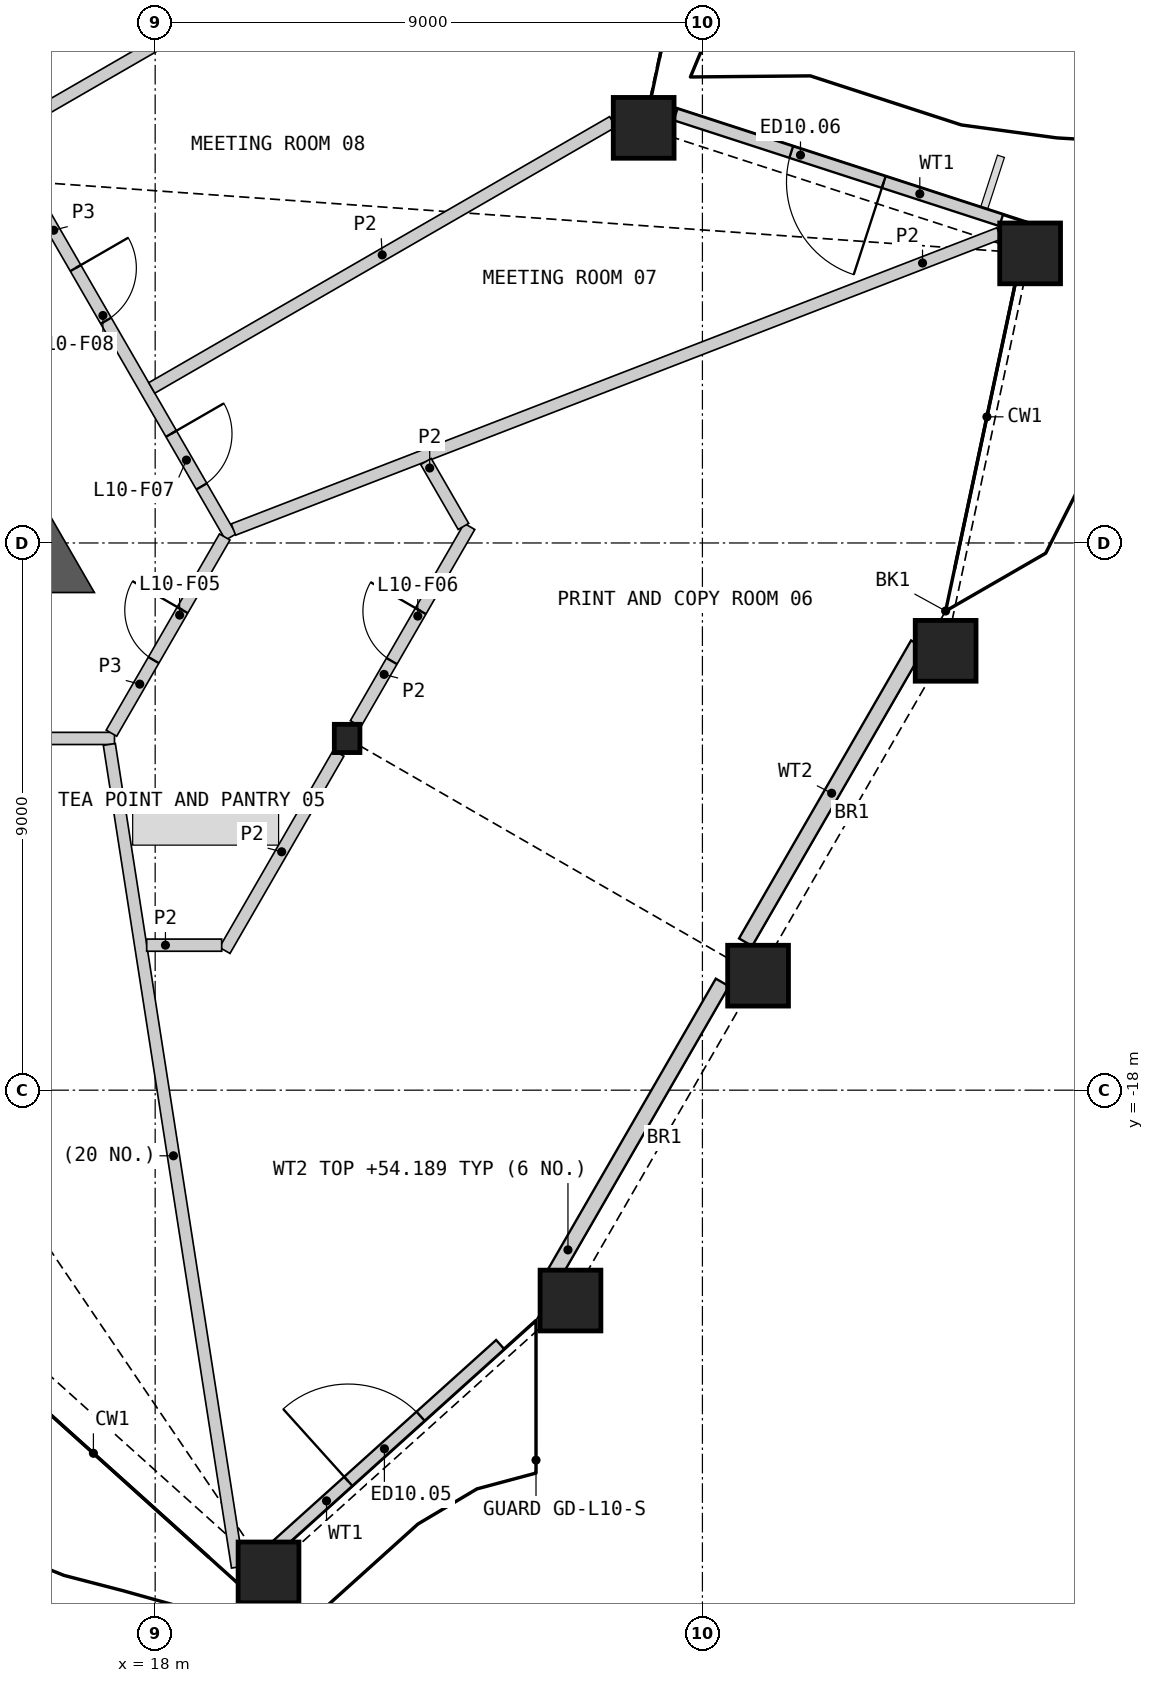
"""IFC4 building model, lengths in metres.
Left out: names, types, materials, properties, quantities, classifications, styles, units other than length and angle.
Written with IfcOpenShell. Run it as: python <this file> out.ifc"""

import sys

from ifc_helpers import new_model, si_unit, direction, frame, frame_2d, origin, origin_2d, place, context, subcontext, project, spatial, polyline, rectangle, hollow_rectangle, i_section, outline, extrude, element, fill, save


model = new_model("IFC4")
c1 = context("Model", 3, precision=1e-05, world=origin(), true_north=direction((0.0, 1.0)))
c2 = subcontext(c1, "Body", "Model", "MODEL_VIEW")
j1 = project(units=[si_unit("LENGTHUNIT", "METRE"), si_unit("PLANEANGLEUNIT", "RADIAN")], contexts=[c1])
p1 = place(None, origin())
s1 = spatial("IfcSite", under=j1, at=p1, CompositionType="ELEMENT")
p2 = place(p1, origin())
s2 = spatial("IfcBuilding", under=s1, at=p2, CompositionType="ELEMENT")
p3 = place(p2, frame((0.0, 0.0, 51.0)))
s3 = spatial("IfcBuildingStorey", under=s2, at=p3, CompositionType="ELEMENT", Elevation=51.0)
for number, where, z_axis, x_axis in (
    (1, (19.864, -25.931, 0.0), (0.0, 0.0, 1.0), (1.0, 0.0, 0.0)),
    (2, (24.83, -21.46, 0.0), (0.0, 0.0, 1.0), (1.0, 0.0, 0.0)),
    (3, (27.915, -16.117, 0.0), (0.0, 0.0, 1.0), (1.0, 0.0, 0.0)),
    (4, (31.0, -10.774, 0.0), (0.0, 0.0, 1.0), (1.0, 0.0, 0.0)),
    (5, (32.389, -4.237, 0.0), (0.0, 0.0, 1.0), (1.0, 0.0, 0.0)),
    (6, (26.034, -2.172, 0.0), (0.0, 0.0, 1.0), (1.0, 0.0, 0.0)),
):
    element("IfcColumn", number, at=place(p3, frame(where, z_axis=z_axis, x_axis=x_axis)), inside=s3, PredefinedType="COLUMN", context=c2, shape_type="SweptSolid", body=[
        extrude(hollow_rectangle(XDim=1.0, YDim=1.0, WallThickness=0.07, at=origin_2d()), origin(), (0.0, 0.0, 1.0), 4.2),
    ])
p4 = place(p3, frame((21.157, -12.215, 0.0), z_axis=(0.0, 0.0, 1.0), x_axis=(1.0, 0.0, 0.0)))
e7 = element("IfcColumn", 7, at=p4, inside=s3, PredefinedType="COLUMN", context=c2, shape_type="SweptSolid", body=[
    extrude(i_section(OverallWidth=0.421, OverallDepth=0.465, WebThickness=0.045, FlangeThickness=0.072, at=origin_2d()), origin(), (0.0, 0.0, 1.0), 4.2),
])
p5 = place(p3, frame((19.866, -25.612, 0.0), z_axis=(0.0, 0.0, 1.0), x_axis=(0.743159085791, 0.669114768337, 0.0)))
e8 = element("IfcWall", 8, at=p5, inside=s3, PredefinedType="SOLIDWALL", context=c2, shape_type="SweptSolid", body=[
    extrude(rectangle(XDim=5.124, YDim=0.2, at=frame_2d((2.562, 0.0))), origin(), (0.0, 0.0, 1.0), 3.189),
])
p6 = place(p5, frame((1.762, 0.0, 0.0)))
e9 = element("IfcOpeningElement", 9, at=p6, cuts=e8, PredefinedType="OPENING", context=c2, shape_type="SweptSolid", body=[
    extrude(rectangle(XDim=1.6, YDim=2.4, at=frame_2d((0.8, 1.2))), frame((0.0, 0.11, 0.0), z_axis=(0.0, -1.0, 0.0), x_axis=(1.0, 0.0, 0.0)), (0.0, 0.0, 1.0), 0.22),
])
p7 = place(p3, frame((24.507, -21.116, 0.0), z_axis=(0.0, 0.0, 1.0), x_axis=(0.49999579099, 0.866027833844, 0.0)))
e10 = element("IfcWall", 10, at=p7, inside=s3, PredefinedType="SOLIDWALL", context=c2, shape_type="SweptSolid", body=[
    extrude(rectangle(XDim=5.644, YDim=0.25, at=frame_2d((2.822, 0.0))), origin(), (0.0, 0.0, 1.0), 3.189),
])
p8 = place(p3, frame((27.71, -15.567, 0.0), z_axis=(0.0, 0.0, 1.0), x_axis=(0.499985074313, 0.866034020963, 0.0)))
e11 = element("IfcWall", 11, at=p8, inside=s3, PredefinedType="SOLIDWALL", context=c2, shape_type="SweptSolid", body=[
    extrude(rectangle(XDim=5.66, YDim=0.25, at=frame_2d((2.83, 0.0))), origin(), (0.0, 0.0, 1.0), 3.189),
])
p9 = place(p3, frame((31.914, -3.693, 0.0), z_axis=(0.0, 0.0, 1.0), x_axis=(-0.951049360908, 0.309039015525, 0.0)))
e12 = element("IfcWall", 12, at=p9, inside=s3, PredefinedType="SOLIDWALL", context=c2, shape_type="SweptSolid", body=[
    extrude(rectangle(XDim=5.631, YDim=0.2, at=frame_2d((2.815, 0.0))), origin(), (0.0, 0.0, 1.0), 3.189),
])
p10 = place(p9, frame((2.031, 0.0, 0.0)))
e13 = element("IfcOpeningElement", 13, at=p10, cuts=e12, PredefinedType="OPENING", context=c2, shape_type="SweptSolid", body=[
    extrude(rectangle(XDim=1.6, YDim=2.4, at=frame_2d((0.8, 1.2))), frame((0.0, 0.11, 0.0), z_axis=(0.0, -1.0, 0.0), x_axis=(1.0, 0.0, 0.0)), (0.0, 0.0, 1.0), 0.22),
])
p11 = place(p3, origin())
e14 = element("IfcWall", 14, at=p11, inside=s3, PredefinedType="SHEAR", context=c2, shape_type="SweptSolid", body=[
    extrude(outline(polyline([(15.441, -9.815), (15.441, -8.915), (16.221, -8.465), (17.0, -9.815), (15.441, -9.815)])), origin(), (0.0, 0.0, 1.0), 3.8),
])
p12 = place(p3, frame((10.821, -12.215, 0.0), z_axis=(0.0, 0.0, 1.0), x_axis=(1.0, 0.0, 0.0)))
e15 = element("IfcWall", 15, at=p12, inside=s3, PredefinedType="PARTITIONING", context=c2, shape_type="SweptSolid", body=[
    extrude(rectangle(XDim=6.51, YDim=0.2, at=frame_2d((3.255, 0.0))), origin(), (0.0, 0.0, 1.0), 3.8),
])
p13 = place(p12, frame((2.655, 0.0, 0.0)))
e16 = element("IfcOpeningElement", 16, at=p13, cuts=e15, PredefinedType="OPENING", context=c2, shape_type="SweptSolid", body=[
    extrude(rectangle(XDim=1.0, YDim=2.1, at=frame_2d((0.5, 1.05))), frame((0.0, 0.11, 0.0), z_axis=(0.0, -1.0, 0.0), x_axis=(1.0, 0.0, 0.0)), (0.0, 0.0, 1.0), 0.22),
])
p14 = place(p3, frame((16.008, -3.296, 0.0), z_axis=(0.0, 0.0, 1.0), x_axis=(0.499984737558, -0.86603421538, 0.0)))
e17 = element("IfcWall", 17, at=p14, inside=s3, PredefinedType="PARTITIONING", context=c2, shape_type="SweptSolid", body=[
    extrude(rectangle(XDim=6.473, YDim=0.2, at=frame_2d((3.236, 0.0))), origin(), (0.0, 0.0, 1.0), 3.8),
])
p15 = place(p14, frame((4.512, 0.0, 0.0)))
e18 = element("IfcOpeningElement", 18, at=p15, cuts=e17, PredefinedType="OPENING", context=c2, shape_type="SweptSolid", body=[
    extrude(rectangle(XDim=1.0, YDim=2.1, at=frame_2d((0.5, 1.05))), frame((0.0, 0.11, 0.0), z_axis=(0.0, -1.0, 0.0), x_axis=(1.0, 0.0, 0.0)), (0.0, 0.0, 1.0), 0.22),
])
p16 = place(p14, frame((1.366, 0.0, 0.0)))
e19 = element("IfcOpeningElement", 19, at=p16, cuts=e17, PredefinedType="OPENING", context=c2, shape_type="SweptSolid", body=[
    extrude(rectangle(XDim=1.0, YDim=2.1, at=frame_2d((0.5, 1.05))), frame((0.0, 0.11, 0.0), z_axis=(0.0, -1.0, 0.0), x_axis=(1.0, 0.0, 0.0)), (0.0, 0.0, 1.0), 0.22),
])
p17 = place(p3, frame((17.281, -12.128, 0.0), z_axis=(0.0, 0.0, 1.0), x_axis=(0.499958791762, 0.866049194065, 0.0)))
e20 = element("IfcWall", 20, at=p17, inside=s3, PredefinedType="PARTITIONING", context=c2, shape_type="SweptSolid", body=[
    extrude(rectangle(XDim=3.726, YDim=0.2, at=frame_2d((1.863, 0.0))), origin(), (0.0, 0.0, 1.0), 3.8),
])
p18 = place(p17, frame((1.388, 0.0, 0.0)))
e21 = element("IfcOpeningElement", 21, at=p18, cuts=e20, PredefinedType="OPENING", context=c2, shape_type="SweptSolid", body=[
    extrude(rectangle(XDim=0.95, YDim=2.1, at=frame_2d((0.475, 1.05))), frame((0.0, 0.11, 0.0), z_axis=(0.0, -1.0, 0.0), x_axis=(1.0, 0.0, 0.0)), (0.0, 0.0, 1.0), 0.22),
])
p19 = place(p3, frame((17.246, -12.314, 0.0), z_axis=(0.0, 0.0, 1.0), x_axis=(0.153927101979, -0.98808220674, 0.0)))
e22 = element("IfcWall", 22, at=p19, inside=s3, PredefinedType="PARTITIONING", context=c2, shape_type="SweptSolid", body=[
    extrude(rectangle(XDim=13.694, YDim=0.2, at=frame_2d((6.847, 0.0))), origin(), (0.0, 0.0, 1.0), 2.885),
])
p20 = place(p3, frame((19.287, -8.779, 0.0), z_axis=(0.0, 0.0, 1.0), x_axis=(0.932669586354, 0.360731815467, 0.0)))
e23 = element("IfcWall", 23, at=p20, inside=s3, PredefinedType="PARTITIONING", context=c2, shape_type="SweptSolid", body=[
    extrude(rectangle(XDim=13.501, YDim=0.2, at=frame_2d((6.75, 0.0))), origin(), (0.0, 0.0, 1.0), 2.885),
])
p21 = place(p3, frame((15.518, -2.248, 0.0), z_axis=(0.0, 0.0, 1.0), x_axis=(0.866025231175, 0.500000298968, 0.0)))
e24 = element("IfcWall", 24, at=p21, inside=s3, PredefinedType="PARTITIONING", context=c2, shape_type="SweptSolid", body=[
    extrude(rectangle(XDim=13.159, YDim=0.2, at=frame_2d((6.579, 0.0))), origin(), (0.0, 0.0, 1.0), 2.885),
])
p22 = place(p3, frame((17.944, -6.45, 0.0), z_axis=(0.0, 0.0, 1.0), x_axis=(0.866025328989, 0.50000012955, 0.0)))
e25 = element("IfcWall", 25, at=p22, inside=s3, PredefinedType="PARTITIONING", context=c2, shape_type="SweptSolid", body=[
    extrude(rectangle(XDim=8.752, YDim=0.2, at=frame_2d((4.376, 0.0))), origin(), (0.0, 0.0, 1.0), 2.885),
])
p23 = place(p3, frame((21.297, -11.973, 0.0), z_axis=(0.0, 0.0, 1.0), x_axis=(0.500008291124, 0.866020616849, 0.0)))
e26 = element("IfcWall", 26, at=p23, inside=s3, PredefinedType="PARTITIONING", context=c2, shape_type="SweptSolid", body=[
    extrude(rectangle(XDim=3.746, YDim=0.2, at=frame_2d((1.873, 0.0))), origin(), (0.0, 0.0, 1.0), 2.885),
])
p24 = place(p23, frame((1.189, 0.0, 0.0)))
e27 = element("IfcOpeningElement", 27, at=p24, cuts=e26, PredefinedType="OPENING", context=c2, shape_type="SweptSolid", body=[
    extrude(rectangle(XDim=0.95, YDim=2.1, at=frame_2d((0.475, 1.05))), frame((0.0, 0.11, 0.0), z_axis=(0.0, -1.0, 0.0), x_axis=(1.0, 0.0, 0.0)), (0.0, 0.0, 1.0), 0.22),
])
p25 = place(p3, frame((19.144, -15.702, 0.0), z_axis=(0.0, 0.0, 1.0), x_axis=(0.500028947347, 0.866008690381, 0.0)))
e28 = element("IfcWall", 28, at=p25, inside=s3, PredefinedType="PARTITIONING", context=c2, shape_type="SweptSolid", body=[
    extrude(rectangle(XDim=3.746, YDim=0.2, at=frame_2d((1.873, 0.0))), origin(), (0.0, 0.0, 1.0), 2.885),
])
p26 = place(p3, frame((22.453, -7.66, 0.0), z_axis=(0.0, 0.0, 1.0), x_axis=(0.499928040405, -0.86606694569, 0.0)))
e29 = element("IfcWall", 29, at=p26, inside=s3, PredefinedType="PARTITIONING", context=c2, shape_type="SweptSolid", body=[
    extrude(rectangle(XDim=1.234, YDim=0.2, at=frame_2d((0.617, 0.0))), origin(), (0.0, 0.0, 1.0), 2.885),
])
p27 = place(p3, frame((17.861, -15.615, 0.0), z_axis=(0.0, 0.0, 1.0), x_axis=(1.0, 0.0, 0.0)))
e30 = element("IfcWall", 30, at=p27, inside=s3, PredefinedType="PARTITIONING", context=c2, shape_type="SweptSolid", body=[
    extrude(rectangle(XDim=1.233, YDim=0.2, at=frame_2d((0.617, 0.0))), origin(), (0.0, 0.0, 1.0), 2.885),
])
p28 = place(p6, origin())
e31 = element("IfcDoor", 31, at=p28, inside=s3, OperationType="DOUBLE_DOOR_SINGLE_SWING", PredefinedType="DOOR", context=c2, shape_type="SweptSolid", body=[
    extrude(rectangle(XDim=1.6, YDim=2.4, at=frame_2d((0.8, 1.2))), frame((0.0, 0.025, 0.0), z_axis=(0.0, -1.0, 0.0), x_axis=(1.0, 0.0, 0.0)), (0.0, 0.0, 1.0), 0.05),
])
fill(e9, e31)
p29 = place(p10, origin())
e32 = element("IfcDoor", 32, at=p29, inside=s3, OperationType="DOUBLE_DOOR_SINGLE_SWING", PredefinedType="DOOR", context=c2, shape_type="SweptSolid", body=[
    extrude(rectangle(XDim=1.6, YDim=2.4, at=frame_2d((0.8, 1.2))), frame((0.0, 0.025, 0.0), z_axis=(0.0, -1.0, 0.0), x_axis=(1.0, 0.0, 0.0)), (0.0, 0.0, 1.0), 0.05),
])
fill(e13, e32)
p30 = place(p18, origin())
e33 = element("IfcDoor", 33, at=p30, inside=s3, OperationType="SINGLE_SWING_RIGHT", PredefinedType="DOOR", context=c2, shape_type="SweptSolid", body=[
    extrude(rectangle(XDim=0.95, YDim=2.1, at=frame_2d((0.475, 1.05))), frame((0.0, 0.025, 0.0), z_axis=(0.0, -1.0, 0.0), x_axis=(1.0, 0.0, 0.0)), (0.0, 0.0, 1.0), 0.05),
])
fill(e21, e33)
p31 = place(p24, origin())
e34 = element("IfcDoor", 34, at=p31, inside=s3, OperationType="SINGLE_SWING_RIGHT", PredefinedType="DOOR", context=c2, shape_type="SweptSolid", body=[
    extrude(rectangle(XDim=0.95, YDim=2.1, at=frame_2d((0.475, 1.05))), frame((0.0, 0.025, 0.0), z_axis=(0.0, -1.0, 0.0), x_axis=(1.0, 0.0, 0.0)), (0.0, 0.0, 1.0), 0.05),
])
fill(e27, e34)
p32 = place(p15, origin())
e35 = element("IfcDoor", 35, at=p32, inside=s3, OperationType="SINGLE_SWING_LEFT", PredefinedType="DOOR", context=c2, shape_type="SweptSolid", body=[
    extrude(rectangle(XDim=1.0, YDim=2.1, at=frame_2d((0.5, 1.05))), frame((0.0, 0.025, 0.0), z_axis=(0.0, -1.0, 0.0), x_axis=(1.0, 0.0, 0.0)), (0.0, 0.0, 1.0), 0.05),
])
fill(e18, e35)
p33 = place(p16, origin())
e36 = element("IfcDoor", 36, at=p33, inside=s3, OperationType="SINGLE_SWING_LEFT", PredefinedType="DOOR", context=c2, shape_type="SweptSolid", body=[
    extrude(rectangle(XDim=1.0, YDim=2.1, at=frame_2d((0.5, 1.05))), frame((0.0, 0.025, 0.0), z_axis=(0.0, -1.0, 0.0), x_axis=(1.0, 0.0, 0.0)), (0.0, 0.0, 1.0), 0.05),
])
fill(e19, e36)
save(model, sys.argv[1])
